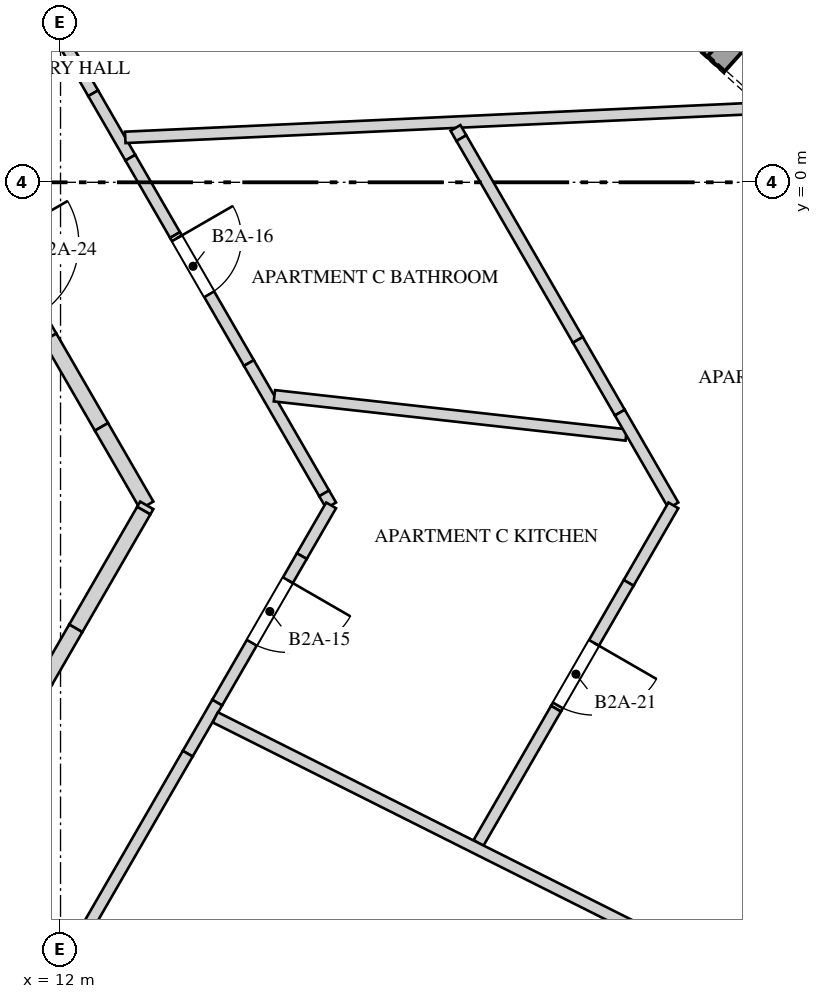
"""IFC4 building model, lengths in metres.
Left out: names, types, materials, properties, quantities, classifications, styles, units other than length and angle.
Written with IfcOpenShell. Run it as: python <this file> out.ifc"""

import sys

from ifc_helpers import new_model, si_unit, direction, frame, frame_2d, origin, place, context, subcontext, project, spatial, polyline, rectangle, outline, extrude, element, fill, save


model = new_model("IFC4")
c1 = context("Model", 3, precision=1e-05, world=origin(), true_north=direction((0.0, 1.0)))
c2 = subcontext(c1, "Body", "Model", "MODEL_VIEW")
j1 = project(units=[si_unit("LENGTHUNIT", "METRE"), si_unit("PLANEANGLEUNIT", "RADIAN")], contexts=[c1])
p1 = place(None, origin())
s1 = spatial("IfcSite", under=j1, at=p1, CompositionType="ELEMENT")
p2 = place(p1, origin())
s2 = spatial("IfcBuilding", under=s1, at=p2, CompositionType="ELEMENT")
p3 = place(p2, frame((0.0, 0.0, 88.4)))
s3 = spatial("IfcBuildingStorey", under=s2, at=p3, CompositionType="ELEMENT", Elevation=88.4)
p4 = place(p3, frame((20.607, 1.764, 0.0), z_axis=(0.0, 0.0, 1.0), x_axis=(-0.743182653308, 0.669088591909, 0.0)))
e1 = element("IfcWall", 1, at=p4, inside=s3, PredefinedType="SOLIDWALL", context=c2, shape_type="SweptSolid", body=[
    extrude(rectangle(XDim=2.287, YDim=0.3, at=frame_2d((1.143, 0.0))), origin(), (0.0, 0.0, 1.0), 3.3),
])
p5 = place(p4, frame((0.293, 0.0, 0.0)))
e2 = element("IfcOpeningElement", 2, at=p5, cuts=e1, PredefinedType="OPENING", context=c2, shape_type="SweptSolid", body=[
    extrude(rectangle(XDim=1.7, YDim=2.4, at=frame_2d((0.85, 1.2))), frame((0.0, 0.16, 0.0), z_axis=(0.0, -1.0, 0.0), x_axis=(1.0, 0.0, 0.0)), (0.0, 0.0, 1.0), 0.32),
])
p6 = place(p3, frame((22.659, 3.819, 0.0), z_axis=(0.0, 0.0, 1.0), x_axis=(-0.669115082961, -0.743158802514, 0.0)))
e3 = element("IfcWall", 3, at=p6, inside=s3, PredefinedType="SOLIDWALL", context=c2, shape_type="SweptSolid", body=[
    extrude(rectangle(XDim=3.05, YDim=0.3, at=frame_2d((1.525, 0.0))), origin(), (0.0, 0.0, 1.0), 3.3),
])
p7 = place(p3, frame((10.849, 3.908, 0.0), z_axis=(0.0, 0.0, 1.0), x_axis=(0.500027861653, -0.866009317254, 0.0)))
e4 = element("IfcWall", 4, at=p7, inside=s3, PredefinedType="PARTITIONING", context=c2, shape_type="SweptSolid", body=[
    extrude(rectangle(XDim=3.16, YDim=0.15, at=frame_2d((1.58, 0.0))), origin(), (0.0, 0.0, 1.0), 3.65),
])
p8 = place(p7, frame((1.307, 0.0, 0.0)))
e5 = element("IfcOpeningElement", 5, at=p8, cuts=e4, PredefinedType="OPENING", context=c2, shape_type="SweptSolid", body=[
    extrude(rectangle(XDim=0.95, YDim=2.4, at=frame_2d((0.475, 1.2))), frame((0.0, 0.085, 0.0), z_axis=(0.0, -1.0, 0.0), x_axis=(1.0, 0.0, 0.0)), (0.0, 0.0, 1.0), 0.17),
])
p9 = place(p3, frame((12.429, 1.172, 0.0), z_axis=(0.0, 0.0, 1.0), x_axis=(0.499895202697, -0.866085900082, 0.0)))
e6 = element("IfcWall", 6, at=p9, inside=s3, PredefinedType="PARTITIONING", context=c2, shape_type="SweptSolid", body=[
    extrude(rectangle(XDim=0.979, YDim=0.15, at=frame_2d((0.489, 0.0))), origin(), (0.0, 0.0, 1.0), 2.55),
])
p10 = place(p3, frame((12.919, 0.324, 0.0), z_axis=(0.0, 0.0, 1.0), x_axis=(0.500028278809, -0.866009076391, 0.0)))
e7 = element("IfcWall", 7, at=p10, inside=s3, PredefinedType="PARTITIONING", context=c2, shape_type="SweptSolid", body=[
    extrude(rectangle(XDim=1.175, YDim=0.15, at=frame_2d((0.587, 0.0))), origin(), (0.0, 0.0, 1.0), 3.65),
])
p11 = place(p3, frame((13.506, -0.693, 0.0), z_axis=(0.0, 0.0, 1.0), x_axis=(0.500001430823, -0.866024577697, 0.0)))
e8 = element("IfcWall", 8, at=p11, inside=s3, PredefinedType="PARTITIONING", context=c2, shape_type="SweptSolid", body=[
    extrude(outline(polyline([(0.0, 0.0), (1.944, 0.0), (1.945, 2.55), (0.84, 2.55), (0.84, 3.65), (0.0, 3.65), (0.0, 0.0)])), frame((0.0, 0.075, 0.0), z_axis=(0.0, -1.0, 0.0), x_axis=(1.0, 0.0, 0.0)), (0.0, 0.0, 1.0), 0.15),
])
p12 = place(p11, frame((0.05, 0.0, 0.0)))
e9 = element("IfcOpeningElement", 9, at=p12, cuts=e8, PredefinedType="OPENING", context=c2, shape_type="SweptSolid", body=[
    extrude(rectangle(XDim=0.85, YDim=2.4, at=frame_2d((0.425, 1.2))), frame((0.0, 0.085, 0.0), z_axis=(0.0, -1.0, 0.0), x_axis=(1.0, 0.0, 0.0)), (0.0, 0.0, 1.0), 0.17),
])
p13 = place(p3, frame((14.478, -2.377, 0.0), z_axis=(0.0, 0.0, 1.0), x_axis=(0.499971491109, -0.866041862775, 0.0)))
e10 = element("IfcWall", 10, at=p13, inside=s3, PredefinedType="PARTITIONING", context=c2, shape_type="SweptSolid", body=[
    extrude(rectangle(XDim=1.98, YDim=0.15, at=frame_2d((0.99, 0.0))), origin(), (0.0, 0.0, 1.0), 3.65),
])
p14 = place(p3, frame((15.468, -4.092, 0.0), z_axis=(0.0, 0.0, 1.0), x_axis=(0.50045593687, -0.865762008436, 0.0)))
e11 = element("IfcWall", 11, at=p14, inside=s3, PredefinedType="PARTITIONING", context=c2, shape_type="SweptSolid", body=[
    extrude(rectangle(XDim=0.182, YDim=0.15, at=frame_2d((0.091, 0.0))), origin(), (0.0, 0.0, 1.0), 2.55),
])
p15 = place(p3, frame((12.851, 0.591, 0.0), z_axis=(0.0, 0.0, 1.0), x_axis=(0.998944359646, 0.045936546805, 0.0)))
e12 = element("IfcWall", 12, at=p15, inside=s3, PredefinedType="PARTITIONING", context=c2, shape_type="SweptSolid", body=[
    extrude(rectangle(XDim=11.475, YDim=0.15, at=frame_2d((5.737, 0.0))), origin(), (0.0, 0.0, 1.0), 2.55),
])
p16 = place(p3, frame((14.814, -2.808, 0.0), z_axis=(0.0, 0.0, 1.0), x_axis=(0.993844670605, -0.110782537929, 0.0)))
e13 = element("IfcWall", 13, at=p16, inside=s3, PredefinedType="PARTITIONING", context=c2, shape_type="SweptSolid", body=[
    extrude(rectangle(XDim=4.656, YDim=0.15, at=frame_2d((2.328, 0.0))), origin(), (0.0, 0.0, 1.0), 3.65),
])
p17 = place(p3, frame((15.56, -4.25, 0.0), z_axis=(0.0, 0.0, 1.0), x_axis=(-0.500124558158, -0.865953478154, 0.0)))
e14 = element("IfcWall", 14, at=p17, inside=s3, PredefinedType="PARTITIONING", context=c2, shape_type="SweptSolid", body=[
    extrude(rectangle(XDim=0.771, YDim=0.15, at=frame_2d((0.385, 0.0))), origin(), (0.0, 0.0, 1.0), 2.55),
])
p18 = place(p3, frame((15.174, -4.917, 0.0), z_axis=(0.0, 0.0, 1.0), x_axis=(-0.49993766618, -0.866061389241, 0.0)))
e15 = element("IfcWall", 15, at=p18, inside=s3, PredefinedType="PARTITIONING", context=c2, shape_type="SweptSolid", body=[
    extrude(rectangle(XDim=2.226, YDim=0.15, at=frame_2d((1.113, 0.0))), origin(), (0.0, 0.0, 1.0), 3.65),
])
p19 = place(p18, frame((0.366, 0.0, 0.0)))
e16 = element("IfcOpeningElement", 16, at=p19, cuts=e15, PredefinedType="OPENING", context=c2, shape_type="SweptSolid", body=[
    extrude(rectangle(XDim=0.95, YDim=2.4, at=frame_2d((0.475, 1.2))), frame((0.0, 0.085, 0.0), z_axis=(0.0, -1.0, 0.0), x_axis=(1.0, 0.0, 0.0)), (0.0, 0.0, 1.0), 0.17),
])
p20 = place(p3, frame((14.061, -6.845, 0.0), z_axis=(0.0, 0.0, 1.0), x_axis=(-0.500031167255, -0.866007408613, 0.0)))
e17 = element("IfcWall", 17, at=p20, inside=s3, PredefinedType="PARTITIONING", context=c2, shape_type="SweptSolid", body=[
    extrude(rectangle(XDim=0.776, YDim=0.15, at=frame_2d((0.388, 0.0))), origin(), (0.0, 0.0, 1.0), 2.75),
])
p21 = place(p3, frame((13.673, -7.517, 0.0), z_axis=(0.0, 0.0, 1.0), x_axis=(-0.500007369519, -0.866021148949, 0.0)))
e18 = element("IfcWall", 18, at=p21, inside=s3, PredefinedType="PARTITIONING", context=c2, shape_type="SweptSolid", body=[
    extrude(rectangle(XDim=4.426, YDim=0.15, at=frame_2d((2.213, 0.0))), origin(), (0.0, 0.0, 1.0), 3.65),
])
p22 = place(p3, frame((17.196, 0.716, 0.0), z_axis=(0.0, 0.0, 1.0), x_axis=(0.499858525911, -0.866107068482, 0.0)))
e19 = element("IfcWall", 19, at=p22, inside=s3, PredefinedType="PARTITIONING", context=c2, shape_type="SweptSolid", body=[
    extrude(rectangle(XDim=0.155, YDim=0.15, at=frame_2d((0.078, 0.0))), origin(), (0.0, 0.0, 1.0), 2.55),
])
p23 = place(p3, frame((17.274, 0.581, 0.0), z_axis=(0.0, 0.0, 1.0), x_axis=(0.500037354383, -0.866003836147, 0.0)))
e20 = element("IfcWall", 20, at=p23, inside=s3, PredefinedType="PARTITIONING", context=c2, shape_type="SweptSolid", body=[
    extrude(rectangle(XDim=3.065, YDim=0.15, at=frame_2d((1.532, 0.0))), origin(), (0.0, 0.0, 1.0), 3.65),
])
p24 = place(p3, frame((18.806, -2.073, 0.0), z_axis=(0.0, 0.0, 1.0), x_axis=(0.499894629757, -0.866086230776, 0.0)))
e21 = element("IfcWall", 21, at=p24, inside=s3, PredefinedType="PARTITIONING", context=c2, shape_type="SweptSolid", body=[
    extrude(rectangle(XDim=1.105, YDim=0.15, at=frame_2d((0.552, 0.0))), origin(), (0.0, 0.0, 1.0), 2.55),
])
p25 = place(p3, frame((19.358, -3.03, 0.0), z_axis=(0.0, 0.0, 1.0), x_axis=(0.500052415518, -0.865995139556, 0.0)))
e22 = element("IfcWall", 22, at=p25, inside=s3, PredefinedType="PARTITIONING", context=c2, shape_type="SweptSolid", body=[
    extrude(rectangle(XDim=1.409, YDim=0.15, at=frame_2d((0.705, 0.0))), origin(), (0.0, 0.0, 1.0), 3.65),
])
p26 = place(p3, frame((20.063, -4.25, 0.0), z_axis=(0.0, 0.0, 1.0), x_axis=(-0.500063427972, -0.865988780531, 0.0)))
e23 = element("IfcWall", 23, at=p26, inside=s3, PredefinedType="PARTITIONING", context=c2, shape_type="SweptSolid", body=[
    extrude(rectangle(XDim=1.177, YDim=0.15, at=frame_2d((0.589, 0.0))), origin(), (0.0, 0.0, 1.0), 3.65),
])
p27 = place(p3, frame((19.474, -5.27, 0.0), z_axis=(0.0, 0.0, 1.0), x_axis=(-0.499998833779, -0.866026077102, 0.0)))
e24 = element("IfcWall", 24, at=p27, inside=s3, PredefinedType="PARTITIONING", context=c2, shape_type="SweptSolid", body=[
    extrude(outline(polyline([(0.0, 0.0), (1.912, 0.0), (1.912, 3.65), (0.9, 3.65), (0.9, 2.55), (0.0, 2.55), (0.0, 0.0)])), frame((0.0, 0.075, 0.0), z_axis=(0.0, -1.0, 0.0), x_axis=(1.0, 0.0, 0.0)), (0.0, 0.0, 1.0), 0.15),
])
p28 = place(p27, frame((0.912, 0.0, 0.0)))
e25 = element("IfcOpeningElement", 25, at=p28, cuts=e24, PredefinedType="OPENING", context=c2, shape_type="SweptSolid", body=[
    extrude(rectangle(XDim=0.95, YDim=2.4, at=frame_2d((0.475, 1.2))), frame((0.0, 0.085, 0.0), z_axis=(0.0, -1.0, 0.0), x_axis=(1.0, 0.0, 0.0)), (0.0, 0.0, 1.0), 0.17),
])
p29 = place(p3, frame((18.518, -6.925, 0.0), z_axis=(0.0, 0.0, 1.0), x_axis=(-0.499950448838, -0.866054010271, 0.0)))
e26 = element("IfcWall", 26, at=p29, inside=s3, PredefinedType="PARTITIONING", context=c2, shape_type="SweptSolid", body=[
    extrude(rectangle(XDim=2.039, YDim=0.15, at=frame_2d((1.02, 0.0))), origin(), (0.0, 0.0, 1.0), 3.65),
])
p30 = place(p3, frame((21.757, -10.911, 0.0), z_axis=(0.0, 0.0, 1.0), x_axis=(-0.893895152109, 0.448276094652, 0.0)))
e27 = element("IfcWall", 27, at=p30, inside=s3, PredefinedType="PARTITIONING", context=c2, shape_type="SweptSolid", body=[
    extrude(rectangle(XDim=8.637, YDim=0.15, at=frame_2d((4.319, 0.0))), origin(), (0.0, 0.0, 1.0), 2.75),
])
p31 = place(p3, frame((11.115, -0.753, 0.0), z_axis=(0.0, 0.0, 1.0), x_axis=(0.499973719246, -0.866040576453, 0.0)))
e28 = element("IfcWall", 28, at=p31, inside=s3, PredefinedType="SOLIDWALL", context=c2, shape_type="SweptSolid", body=[
    extrude(outline(polyline([(0.0, 0.0), (1.486, 0.0), (1.486, 2.55), (0.35, 2.55), (0.35, 3.65), (0.0, 3.65), (0.0, 0.0)])), frame((0.0, 0.1, 0.0), z_axis=(0.0, -1.0, 0.0), x_axis=(1.0, 0.0, 0.0)), (0.0, 0.0, 1.0), 0.2),
])
p32 = place(p31, frame((0.05, 0.0, 0.0)))
e29 = element("IfcOpeningElement", 29, at=p32, cuts=e28, PredefinedType="OPENING", context=c2, shape_type="SweptSolid", body=[
    extrude(rectangle(XDim=1.1, YDim=2.4, at=frame_2d((0.55, 1.2))), frame((0.0, 0.11, 0.0), z_axis=(0.0, -1.0, 0.0), x_axis=(1.0, 0.0, 0.0)), (0.0, 0.0, 1.0), 0.22),
])
p33 = place(p3, frame((11.858, -2.04, 0.0), z_axis=(0.0, 0.0, 1.0), x_axis=(0.500038357328, -0.866003257038, 0.0)))
e30 = element("IfcWall", 30, at=p33, inside=s3, PredefinedType="SOLIDWALL", context=c2, shape_type="SweptSolid", body=[
    extrude(rectangle(XDim=1.36, YDim=0.2, at=frame_2d((0.68, 0.0))), origin(), (0.0, 0.0, 1.0), 3.65),
])
p34 = place(p3, frame((12.539, -3.218, 0.0), z_axis=(0.0, 0.0, 1.0), x_axis=(0.500059236744, -0.865991200733, 0.0)))
e31 = element("IfcWall", 31, at=p34, inside=s3, PredefinedType="SOLIDWALL", context=c2, shape_type="SweptSolid", body=[
    extrude(rectangle(XDim=1.192, YDim=0.2, at=frame_2d((0.596, 0.0))), origin(), (0.0, 0.0, 1.0), 2.55),
])
p35 = place(p3, frame((13.135, -4.25, 0.0), z_axis=(0.0, 0.0, 1.0), x_axis=(-0.501397775159, -0.865216892499, 0.0)))
e32 = element("IfcWall", 32, at=p35, inside=s3, PredefinedType="SOLIDWALL", context=c2, shape_type="SweptSolid", body=[
    extrude(rectangle(XDim=0.08, YDim=0.2, at=frame_2d((0.04, 0.0))), origin(), (0.0, 0.0, 1.0), 2.55),
])
p36 = place(p3, frame((13.095, -4.319, 0.0), z_axis=(0.0, 0.0, 1.0), x_axis=(-0.499986405537, -0.866033252409, 0.0)))
e33 = element("IfcWall", 33, at=p36, inside=s3, PredefinedType="SOLIDWALL", context=c2, shape_type="SweptSolid", body=[
    extrude(rectangle(XDim=1.788, YDim=0.2, at=frame_2d((0.894, 0.0))), origin(), (0.0, 0.0, 1.0), 3.65),
])
p37 = place(p3, frame((12.201, -5.868, 0.0), z_axis=(0.0, 0.0, 1.0), x_axis=(-0.499942357345, -0.866058681229, 0.0)))
e34 = element("IfcWall", 34, at=p37, inside=s3, PredefinedType="SOLIDWALL", context=c2, shape_type="SweptSolid", body=[
    extrude(rectangle(XDim=0.801, YDim=0.2, at=frame_2d((0.4, 0.0))), origin(), (0.0, 0.0, 1.0), 2.75),
])
p38 = place(p19, origin())
e35 = element("IfcDoor", 35, at=p38, inside=s3, OperationType="SINGLE_SWING_LEFT", PredefinedType="DOOR", context=c2, shape_type="SweptSolid", body=[
    extrude(rectangle(XDim=0.95, YDim=2.4, at=frame_2d((0.475, 1.2))), frame((0.0, 0.025, 0.0), z_axis=(0.0, -1.0, 0.0), x_axis=(1.0, 0.0, 0.0)), (0.0, 0.0, 1.0), 0.05),
])
fill(e16, e35)
p39 = place(p12, origin())
e36 = element("IfcDoor", 36, at=p39, inside=s3, OperationType="SINGLE_SWING_RIGHT", PredefinedType="DOOR", context=c2, shape_type="SweptSolid", body=[
    extrude(rectangle(XDim=0.85, YDim=2.4, at=frame_2d((0.425, 1.2))), frame((0.0, 0.025, 0.0), z_axis=(0.0, -1.0, 0.0), x_axis=(1.0, 0.0, 0.0)), (0.0, 0.0, 1.0), 0.05),
])
fill(e9, e36)
p40 = place(p28, origin())
e37 = element("IfcDoor", 37, at=p40, inside=s3, OperationType="SINGLE_SWING_LEFT", PredefinedType="DOOR", context=c2, shape_type="SweptSolid", body=[
    extrude(rectangle(XDim=0.95, YDim=2.4, at=frame_2d((0.475, 1.2))), frame((0.0, 0.025, 0.0), z_axis=(0.0, -1.0, 0.0), x_axis=(1.0, 0.0, 0.0)), (0.0, 0.0, 1.0), 0.05),
])
fill(e25, e37)
save(model, sys.argv[1])
